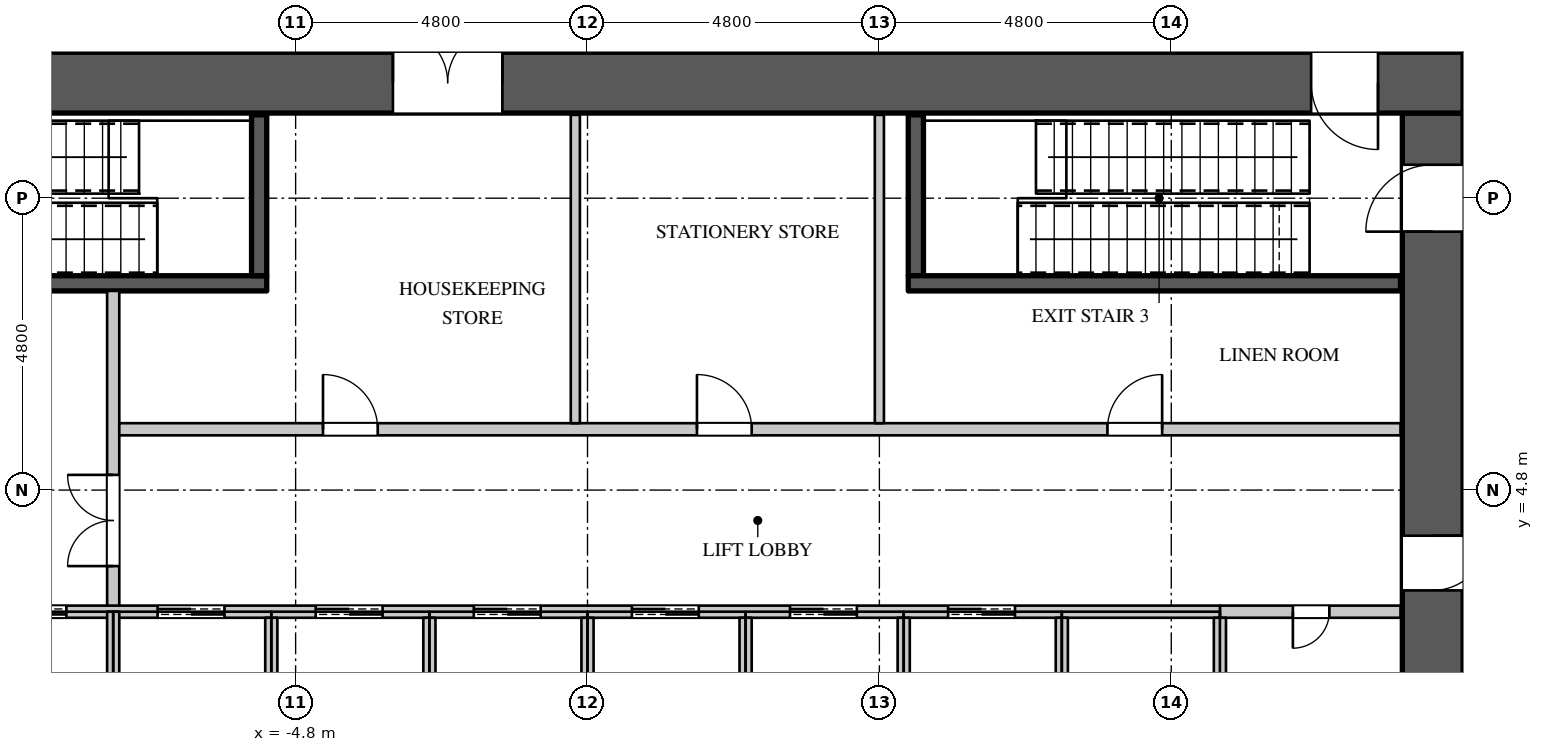
"""IFC4 building model, lengths in metres.
Left out: names, types, materials, properties, quantities, classifications, styles, units other than length and angle.
Written with IfcOpenShell. Run it as: python <this file> out.ifc"""

import sys

from ifc_helpers import new_model, si_unit, direction, frame, frame_2d, origin, place, context, subcontext, project, spatial, rectangle, extrude, element, fill, save


model = new_model("IFC4")
c1 = context("Model", 3, precision=1e-05, world=origin(), true_north=direction((0.0, 1.0)))
c2 = subcontext(c1, "Body", "Model", "MODEL_VIEW")
j1 = project(units=[si_unit("LENGTHUNIT", "METRE"), si_unit("PLANEANGLEUNIT", "RADIAN")], contexts=[c1])
p1 = place(None, origin())
s1 = spatial("IfcSite", under=j1, at=p1, CompositionType="ELEMENT")
p2 = place(p1, origin())
s2 = spatial("IfcBuilding", under=s1, at=p2, CompositionType="ELEMENT")
p3 = place(p2, frame((0.0, 0.0, 101.1)))
s3 = spatial("IfcBuildingStorey", under=s2, at=p3, CompositionType="ELEMENT", Elevation=101.1)
p4 = place(p3, frame((-14.4, 11.5, 0.0), z_axis=(0.0, 0.0, 1.0), x_axis=(1.0, 0.0, 0.0)))
e1 = element("IfcWall", 1, at=p4, inside=s3, PredefinedType="SHEAR", context=c2, shape_type="SweptSolid", body=[
    extrude(rectangle(XDim=28.8, YDim=1.0, at=frame_2d((14.4, 0.0))), origin(), (0.0, 0.0, 1.0), 5.4),
])
p5 = place(p4, frame((1.4, 0.0, 0.0)))
e2 = element("IfcOpeningElement", 2, at=p5, cuts=e1, PredefinedType="OPENING", context=c2, shape_type="SweptSolid", body=[
    extrude(rectangle(XDim=1.1, YDim=2.2, at=frame_2d((0.55, 1.1))), frame((0.0, 0.51, 0.0), z_axis=(0.0, -1.0, 0.0), x_axis=(1.0, 0.0, 0.0)), (0.0, 0.0, 1.0), 1.02),
])
p6 = place(p4, frame((26.3, 0.0, 0.0)))
e3 = element("IfcOpeningElement", 3, at=p6, cuts=e1, PredefinedType="OPENING", context=c2, shape_type="SweptSolid", body=[
    extrude(rectangle(XDim=1.1, YDim=2.2, at=frame_2d((0.55, 1.1))), frame((0.0, 0.51, 0.0), z_axis=(0.0, -1.0, 0.0), x_axis=(1.0, 0.0, 0.0)), (0.0, 0.0, 1.0), 1.02),
])
p7 = place(p4, frame((11.2, 0.0, 0.0)))
e4 = element("IfcOpeningElement", 4, at=p7, cuts=e1, PredefinedType="OPENING", context=c2, shape_type="SweptSolid", body=[
    extrude(rectangle(XDim=1.8, YDim=2.4, at=frame_2d((0.9, 1.2))), frame((0.0, 0.51, 0.0), z_axis=(0.0, -1.0, 0.0), x_axis=(1.0, 0.0, 0.0)), (0.0, 0.0, 1.0), 1.02),
])
p8 = place(p3, frame((13.9, -11.0, 0.0), z_axis=(0.0, 0.0, 1.0), x_axis=(0.0, 1.0, 0.0)))
e5 = element("IfcWall", 5, at=p8, inside=s3, PredefinedType="SHEAR", context=c2, shape_type="SweptSolid", body=[
    extrude(rectangle(XDim=22.0, YDim=1.0, at=frame_2d((11.0, 0.0))), origin(), (0.0, 0.0, 1.0), 5.4),
])
p9 = place(p8, frame((20.05, 0.0, 0.0)))
e6 = element("IfcOpeningElement", 6, at=p9, cuts=e5, PredefinedType="OPENING", context=c2, shape_type="SweptSolid", body=[
    extrude(rectangle(XDim=1.1, YDim=2.2, at=frame_2d((0.55, 1.1))), frame((0.0, 0.51, 0.0), z_axis=(0.0, -1.0, 0.0), x_axis=(1.0, 0.0, 0.0)), (0.0, 0.0, 1.0), 1.02),
])
p10 = place(p8, frame((14.15, 0.0, 0.0)))
e7 = element("IfcOpeningElement", 7, at=p10, cuts=e5, PredefinedType="OPENING", context=c2, shape_type="SweptSolid", body=[
    extrude(rectangle(XDim=0.9, YDim=2.2, at=frame_2d((0.45, 1.1))), frame((0.0, 0.51, 0.0), z_axis=(0.0, -1.0, 0.0), x_axis=(1.0, 0.0, 0.0)), (0.0, 0.0, 1.0), 1.02),
])
p11 = place(p8, frame((0.85, 0.0, 0.0)))
e8 = element("IfcOpeningElement", 8, at=p11, cuts=e5, PredefinedType="OPENING", context=c2, shape_type="SweptSolid", body=[
    extrude(rectangle(XDim=1.1, YDim=2.2, at=frame_2d((0.55, 1.1))), frame((0.0, 0.51, 0.0), z_axis=(0.0, -1.0, 0.0), x_axis=(1.0, 0.0, 0.0)), (0.0, 0.0, 1.0), 1.02),
])
p12 = place(p8, frame((3.5, 0.0, 0.0)))
e9 = element("IfcOpeningElement", 9, at=p12, cuts=e5, PredefinedType="OPENING", context=c2, shape_type="SweptSolid", body=[
    extrude(rectangle(XDim=0.9, YDim=2.2, at=frame_2d((0.45, 1.1))), frame((0.0, 0.51, 0.0), z_axis=(0.0, -1.0, 0.0), x_axis=(1.0, 0.0, 0.0)), (0.0, 0.0, 1.0), 1.02),
])
p13 = place(p3, frame((-7.8, 2.8, 0.0), z_axis=(0.0, 0.0, 1.0), x_axis=(0.0, 1.0, 0.0)))
e10 = element("IfcWall", 10, at=p13, inside=s3, PredefinedType="PARTITIONING", context=c2, shape_type="SweptSolid", body=[
    extrude(rectangle(XDim=5.275, YDim=0.2, at=frame_2d((2.637, 0.0))), origin(), (0.0, 0.0, 1.0), 5.15),
])
p14 = place(p13, frame((0.75, 0.0, 0.0)))
e11 = element("IfcOpeningElement", 11, at=p14, cuts=e10, PredefinedType="OPENING", context=c2, shape_type="SweptSolid", body=[
    extrude(rectangle(XDim=1.5, YDim=2.4, at=frame_2d((0.75, 1.2))), frame((0.0, 0.11, 0.0), z_axis=(0.0, -1.0, 0.0), x_axis=(1.0, 0.0, 0.0)), (0.0, 0.0, 1.0), 0.22),
])
p15 = place(p3, frame((-7.7, 5.8, 0.0), z_axis=(0.0, 0.0, 1.0), x_axis=(1.0, 0.0, 0.0)))
e12 = element("IfcWall", 12, at=p15, inside=s3, PredefinedType="PARTITIONING", context=c2, shape_type="SweptSolid", body=[
    extrude(rectangle(XDim=21.07, YDim=0.2, at=frame_2d((10.535, 0.0))), origin(), (0.0, 0.0, 1.0), 5.15),
])
p16 = place(p15, frame((3.35, 0.0, 0.0)))
e13 = element("IfcOpeningElement", 13, at=p16, cuts=e12, PredefinedType="OPENING", context=c2, shape_type="SweptSolid", body=[
    extrude(rectangle(XDim=0.9, YDim=2.2, at=frame_2d((0.45, 1.1))), frame((0.0, 0.11, 0.0), z_axis=(0.0, -1.0, 0.0), x_axis=(1.0, 0.0, 0.0)), (0.0, 0.0, 1.0), 0.22),
])
p17 = place(p15, frame((9.5, 0.0, 0.0)))
e14 = element("IfcOpeningElement", 14, at=p17, cuts=e12, PredefinedType="OPENING", context=c2, shape_type="SweptSolid", body=[
    extrude(rectangle(XDim=0.9, YDim=2.2, at=frame_2d((0.45, 1.1))), frame((0.0, 0.11, 0.0), z_axis=(0.0, -1.0, 0.0), x_axis=(1.0, 0.0, 0.0)), (0.0, 0.0, 1.0), 0.22),
])
p18 = place(p15, frame((16.25, 0.0, 0.0)))
e15 = element("IfcOpeningElement", 15, at=p18, cuts=e12, PredefinedType="OPENING", context=c2, shape_type="SweptSolid", body=[
    extrude(rectangle(XDim=0.9, YDim=2.2, at=frame_2d((0.45, 1.1))), frame((0.0, 0.11, 0.0), z_axis=(0.0, -1.0, 0.0), x_axis=(1.0, 0.0, 0.0)), (0.0, 0.0, 1.0), 0.22),
])
for number, where, z_axis, x_axis in (
    (16, (-0.2, 5.9, 0.0), (0.0, 0.0, 1.0), (0.0, 1.0, 0.0)),
    (17, (4.8, 5.9, 0.0), (0.0, 0.0, 1.0), (0.0, 1.0, 0.0)),
):
    element("IfcWall", number, at=place(p3, frame(where, z_axis=z_axis, x_axis=x_axis)), inside=s3, PredefinedType="PARTITIONING", context=c2, shape_type="SweptSolid", body=[
        extrude(rectangle(XDim=5.07, YDim=0.15, at=frame_2d((2.535, 0.0))), origin(), (0.0, 0.0, 1.0), 5.15),
    ])
p19 = place(p3, frame((10.4, 2.8, 0.0), z_axis=(0.0, 0.0, 1.0), x_axis=(1.0, 0.0, 0.0)))
e18 = element("IfcWall", 18, at=p19, inside=s3, PredefinedType="PARTITIONING", context=c2, shape_type="SweptSolid", body=[
    extrude(rectangle(XDim=2.97, YDim=0.2, at=frame_2d((1.485, 0.0))), origin(), (0.0, 0.0, 1.0), 5.15),
])
p20 = place(p19, frame((1.2, 0.0, 0.0)))
e19 = element("IfcOpeningElement", 19, at=p20, cuts=e18, PredefinedType="OPENING", context=c2, shape_type="SweptSolid", body=[
    extrude(rectangle(XDim=0.6, YDim=2.0, at=frame_2d((0.3, 1.0))), frame((0.0, 0.11, 0.0), z_axis=(0.0, -1.0, 0.0), x_axis=(1.0, 0.0, 0.0)), (0.0, 0.0, 1.0), 0.22),
])
p21 = place(p3, frame((-13.37, 2.8, 0.0), z_axis=(0.0, 0.0, 1.0), x_axis=(1.0, 0.0, 0.0)))
e20 = element("IfcWall", 20, at=p21, inside=s3, PredefinedType="PARTITIONING", context=c2, shape_type="SweptSolid", body=[
    extrude(rectangle(XDim=23.77, YDim=0.2, at=frame_2d((11.885, 0.0))), origin(), (0.0, 0.0, 1.0), 5.15),
])
p22 = place(p21, frame((0.9, 0.0, 0.0)))
e21 = element("IfcOpeningElement", 21, at=p22, cuts=e20, PredefinedType="OPENING", context=c2, shape_type="SweptSolid", body=[
    extrude(rectangle(XDim=1.1, YDim=2.2, at=frame_2d((0.55, 1.1))), frame((0.0, 0.11, 0.0), z_axis=(0.0, -1.0, 0.0), x_axis=(1.0, 0.0, 0.0)), (0.0, 0.0, 1.0), 0.22),
])
p23 = place(p21, frame((3.7, 0.0, 0.0)))
e22 = element("IfcOpeningElement", 22, at=p23, cuts=e20, PredefinedType="OPENING", context=c2, shape_type="SweptSolid", body=[
    extrude(rectangle(XDim=1.1, YDim=2.2, at=frame_2d((0.55, 1.1))), frame((0.0, 0.11, 0.0), z_axis=(0.0, -1.0, 0.0), x_axis=(1.0, 0.0, 0.0)), (0.0, 0.0, 1.0), 0.22),
])
p24 = place(p21, frame((6.3, 0.0, 0.0)))
e23 = element("IfcOpeningElement", 23, at=p24, cuts=e20, PredefinedType="OPENING", context=c2, shape_type="SweptSolid", body=[
    extrude(rectangle(XDim=1.1, YDim=2.2, at=frame_2d((0.55, 1.1))), frame((0.0, 0.11, 0.0), z_axis=(0.0, -1.0, 0.0), x_axis=(1.0, 0.0, 0.0)), (0.0, 0.0, 1.0), 0.22),
])
p25 = place(p21, frame((8.9, 0.0, 0.0)))
e24 = element("IfcOpeningElement", 24, at=p25, cuts=e20, PredefinedType="OPENING", context=c2, shape_type="SweptSolid", body=[
    extrude(rectangle(XDim=1.1, YDim=2.2, at=frame_2d((0.55, 1.1))), frame((0.0, 0.11, 0.0), z_axis=(0.0, -1.0, 0.0), x_axis=(1.0, 0.0, 0.0)), (0.0, 0.0, 1.0), 0.22),
])
p26 = place(p21, frame((11.5, 0.0, 0.0)))
e25 = element("IfcOpeningElement", 25, at=p26, cuts=e20, PredefinedType="OPENING", context=c2, shape_type="SweptSolid", body=[
    extrude(rectangle(XDim=1.1, YDim=2.2, at=frame_2d((0.55, 1.1))), frame((0.0, 0.11, 0.0), z_axis=(0.0, -1.0, 0.0), x_axis=(1.0, 0.0, 0.0)), (0.0, 0.0, 1.0), 0.22),
])
p27 = place(p21, frame((14.1, 0.0, 0.0)))
e26 = element("IfcOpeningElement", 26, at=p27, cuts=e20, PredefinedType="OPENING", context=c2, shape_type="SweptSolid", body=[
    extrude(rectangle(XDim=1.1, YDim=2.2, at=frame_2d((0.55, 1.1))), frame((0.0, 0.11, 0.0), z_axis=(0.0, -1.0, 0.0), x_axis=(1.0, 0.0, 0.0)), (0.0, 0.0, 1.0), 0.22),
])
p28 = place(p21, frame((16.7, 0.0, 0.0)))
e27 = element("IfcOpeningElement", 27, at=p28, cuts=e20, PredefinedType="OPENING", context=c2, shape_type="SweptSolid", body=[
    extrude(rectangle(XDim=1.1, YDim=2.2, at=frame_2d((0.55, 1.1))), frame((0.0, 0.11, 0.0), z_axis=(0.0, -1.0, 0.0), x_axis=(1.0, 0.0, 0.0)), (0.0, 0.0, 1.0), 0.22),
])
p29 = place(p21, frame((19.3, 0.0, 0.0)))
e28 = element("IfcOpeningElement", 28, at=p29, cuts=e20, PredefinedType="OPENING", context=c2, shape_type="SweptSolid", body=[
    extrude(rectangle(XDim=1.1, YDim=2.2, at=frame_2d((0.55, 1.1))), frame((0.0, 0.11, 0.0), z_axis=(0.0, -1.0, 0.0), x_axis=(1.0, 0.0, 0.0)), (0.0, 0.0, 1.0), 0.22),
])
p30 = place(p3, frame((-7.8, 0.0, 0.0), z_axis=(0.0, 0.0, 1.0), x_axis=(0.0, 1.0, 0.0)))
e29 = element("IfcWall", 29, at=p30, inside=s3, PredefinedType="PARTITIONING", context=c2, shape_type="SweptSolid", body=[
    extrude(rectangle(XDim=2.8, YDim=0.2, at=frame_2d((1.4, 0.0))), origin(), (0.0, 0.0, 1.0), 5.15),
])
for number, where, z_axis, x_axis in (
    (30, (-5.2, 0.1, 0.0), (0.0, 0.0, 1.0), (0.0, 1.0, 0.0)),
    (31, (-2.6, 0.1, 0.0), (0.0, 0.0, 1.0), (0.0, 1.0, 0.0)),
    (32, (0.0, 0.1, 0.0), (0.0, 0.0, 1.0), (0.0, 1.0, 0.0)),
    (33, (2.6, 0.1, 0.0), (0.0, 0.0, 1.0), (0.0, 1.0, 0.0)),
    (34, (5.2, 0.1, 0.0), (0.0, 0.0, 1.0), (0.0, 1.0, 0.0)),
):
    element("IfcWall", number, at=place(p3, frame(where, z_axis=z_axis, x_axis=x_axis)), inside=s3, PredefinedType="PARTITIONING", context=c2, shape_type="SweptSolid", body=[
        extrude(rectangle(XDim=2.6, YDim=0.2, at=frame_2d((1.3, 0.0))), origin(), (0.0, 0.0, 1.0), 5.15),
    ])
p31 = place(p3, frame((7.8, 0.0, 0.0), z_axis=(0.0, 0.0, 1.0), x_axis=(0.0, 1.0, 0.0)))
e35 = element("IfcWall", 35, at=p31, inside=s3, PredefinedType="PARTITIONING", context=c2, shape_type="SweptSolid", body=[
    extrude(rectangle(XDim=2.7, YDim=0.2, at=frame_2d((1.35, 0.0))), origin(), (0.0, 0.0, 1.0), 5.15),
])
p32 = place(p3, frame((10.4, -2.7, 0.0), z_axis=(0.0, 0.0, 1.0), x_axis=(0.0, 1.0, 0.0)))
e36 = element("IfcWall", 36, at=p32, inside=s3, PredefinedType="PARTITIONING", context=c2, shape_type="SweptSolid", body=[
    extrude(rectangle(XDim=5.4, YDim=0.2, at=frame_2d((2.7, 0.0))), origin(), (0.0, 0.0, 1.0), 5.15),
])
p33 = place(p3, frame((-13.37, 8.2, 0.0), z_axis=(0.0, 0.0, 1.0), x_axis=(1.0, 0.0, 0.0)))
e37 = element("IfcWall", 37, at=p33, inside=s3, PredefinedType="SHEAR", context=c2, shape_type="SweptSolid", body=[
    extrude(rectangle(XDim=8.095, YDim=0.25, at=frame_2d((4.048, 0.0))), origin(), (0.0, 0.0, 1.0), 5.15),
])
p34 = place(p33, frame((0.15, 0.0, 0.0)))
e38 = element("IfcOpeningElement", 38, at=p34, cuts=e37, PredefinedType="OPENING", context=c2, shape_type="SweptSolid", body=[
    extrude(rectangle(XDim=1.1, YDim=2.2, at=frame_2d((0.55, 1.1))), frame((0.0, 0.135, 0.0), z_axis=(0.0, -1.0, 0.0), x_axis=(1.0, 0.0, 0.0)), (0.0, 0.0, 1.0), 0.27),
])
for number, where, z_axis, x_axis in (
    (39, (-5.4, 8.325, 0.0), (0.0, 0.0, 1.0), (0.0, 1.0, 0.0)),
    (40, (5.4, 8.325, 0.0), (0.0, 0.0, 1.0), (0.0, 1.0, 0.0)),
):
    element("IfcWall", number, at=place(p3, frame(where, z_axis=z_axis, x_axis=x_axis)), inside=s3, PredefinedType="SHEAR", context=c2, shape_type="SweptSolid", body=[
        extrude(rectangle(XDim=2.645, YDim=0.25, at=frame_2d((1.323, 0.0))), origin(), (0.0, 0.0, 1.0), 5.15),
    ])
p35 = place(p3, frame((5.275, 8.2, 0.0), z_axis=(0.0, 0.0, 1.0), x_axis=(1.0, 0.0, 0.0)))
e41 = element("IfcWall", 41, at=p35, inside=s3, PredefinedType="SHEAR", context=c2, shape_type="SweptSolid", body=[
    extrude(rectangle(XDim=8.095, YDim=0.25, at=frame_2d((4.048, 0.0))), origin(), (0.0, 0.0, 1.0), 5.15),
])
p36 = place(p20, origin())
e42 = element("IfcDoor", 42, at=p36, inside=s3, OperationType="SINGLE_SWING_RIGHT", PredefinedType="DOOR", context=c2, shape_type="SweptSolid", body=[
    extrude(rectangle(XDim=0.6, YDim=2.0, at=frame_2d((0.3, 1.0))), frame((0.0, 0.025, 0.0), z_axis=(0.0, -1.0, 0.0), x_axis=(1.0, 0.0, 0.0)), (0.0, 0.0, 1.0), 0.05),
])
fill(e19, e42)
p37 = place(p16, origin())
e43 = element("IfcDoor", 43, at=p37, inside=s3, OperationType="SINGLE_SWING_LEFT", PredefinedType="DOOR", context=c2, shape_type="SweptSolid", body=[
    extrude(rectangle(XDim=0.9, YDim=2.2, at=frame_2d((0.45, 1.1))), frame((0.0, 0.025, 0.0), z_axis=(0.0, -1.0, 0.0), x_axis=(1.0, 0.0, 0.0)), (0.0, 0.0, 1.0), 0.05),
])
fill(e13, e43)
p38 = place(p17, origin())
e44 = element("IfcDoor", 44, at=p38, inside=s3, OperationType="SINGLE_SWING_LEFT", PredefinedType="DOOR", context=c2, shape_type="SweptSolid", body=[
    extrude(rectangle(XDim=0.9, YDim=2.2, at=frame_2d((0.45, 1.1))), frame((0.0, 0.025, 0.0), z_axis=(0.0, -1.0, 0.0), x_axis=(1.0, 0.0, 0.0)), (0.0, 0.0, 1.0), 0.05),
])
fill(e14, e44)
p39 = place(p18, origin())
e45 = element("IfcDoor", 45, at=p39, inside=s3, OperationType="SINGLE_SWING_RIGHT", PredefinedType="DOOR", context=c2, shape_type="SweptSolid", body=[
    extrude(rectangle(XDim=0.9, YDim=2.2, at=frame_2d((0.45, 1.1))), frame((0.0, 0.025, 0.0), z_axis=(0.0, -1.0, 0.0), x_axis=(1.0, 0.0, 0.0)), (0.0, 0.0, 1.0), 0.05),
])
fill(e15, e45)
p40 = place(p23, origin())
e46 = element("IfcDoor", 46, at=p40, inside=s3, OperationType="DOUBLE_DOOR_SLIDING", PredefinedType="DOOR", context=c2, shape_type="SweptSolid", body=[
    extrude(rectangle(XDim=1.1, YDim=2.2, at=frame_2d((0.55, 1.1))), frame((0.0, 0.025, 0.0), z_axis=(0.0, -1.0, 0.0), x_axis=(1.0, 0.0, 0.0)), (0.0, 0.0, 1.0), 0.05),
])
fill(e22, e46)
p41 = place(p24, origin())
e47 = element("IfcDoor", 47, at=p41, inside=s3, OperationType="DOUBLE_DOOR_SLIDING", PredefinedType="DOOR", context=c2, shape_type="SweptSolid", body=[
    extrude(rectangle(XDim=1.1, YDim=2.2, at=frame_2d((0.55, 1.1))), frame((0.0, 0.025, 0.0), z_axis=(0.0, -1.0, 0.0), x_axis=(1.0, 0.0, 0.0)), (0.0, 0.0, 1.0), 0.05),
])
fill(e23, e47)
p42 = place(p25, origin())
e48 = element("IfcDoor", 48, at=p42, inside=s3, OperationType="DOUBLE_DOOR_SLIDING", PredefinedType="DOOR", context=c2, shape_type="SweptSolid", body=[
    extrude(rectangle(XDim=1.1, YDim=2.2, at=frame_2d((0.55, 1.1))), frame((0.0, 0.025, 0.0), z_axis=(0.0, -1.0, 0.0), x_axis=(1.0, 0.0, 0.0)), (0.0, 0.0, 1.0), 0.05),
])
fill(e24, e48)
p43 = place(p26, origin())
e49 = element("IfcDoor", 49, at=p43, inside=s3, OperationType="DOUBLE_DOOR_SLIDING", PredefinedType="DOOR", context=c2, shape_type="SweptSolid", body=[
    extrude(rectangle(XDim=1.1, YDim=2.2, at=frame_2d((0.55, 1.1))), frame((0.0, 0.025, 0.0), z_axis=(0.0, -1.0, 0.0), x_axis=(1.0, 0.0, 0.0)), (0.0, 0.0, 1.0), 0.05),
])
fill(e25, e49)
p44 = place(p27, origin())
e50 = element("IfcDoor", 50, at=p44, inside=s3, OperationType="DOUBLE_DOOR_SLIDING", PredefinedType="DOOR", context=c2, shape_type="SweptSolid", body=[
    extrude(rectangle(XDim=1.1, YDim=2.2, at=frame_2d((0.55, 1.1))), frame((0.0, 0.025, 0.0), z_axis=(0.0, -1.0, 0.0), x_axis=(1.0, 0.0, 0.0)), (0.0, 0.0, 1.0), 0.05),
])
fill(e26, e50)
p45 = place(p28, origin())
e51 = element("IfcDoor", 51, at=p45, inside=s3, OperationType="DOUBLE_DOOR_SLIDING", PredefinedType="DOOR", context=c2, shape_type="SweptSolid", body=[
    extrude(rectangle(XDim=1.1, YDim=2.2, at=frame_2d((0.55, 1.1))), frame((0.0, 0.025, 0.0), z_axis=(0.0, -1.0, 0.0), x_axis=(1.0, 0.0, 0.0)), (0.0, 0.0, 1.0), 0.05),
])
fill(e27, e51)
p46 = place(p29, origin())
e52 = element("IfcDoor", 52, at=p46, inside=s3, OperationType="DOUBLE_DOOR_SLIDING", PredefinedType="DOOR", context=c2, shape_type="SweptSolid", body=[
    extrude(rectangle(XDim=1.1, YDim=2.2, at=frame_2d((0.55, 1.1))), frame((0.0, 0.025, 0.0), z_axis=(0.0, -1.0, 0.0), x_axis=(1.0, 0.0, 0.0)), (0.0, 0.0, 1.0), 0.05),
])
fill(e28, e52)
p47 = place(p14, origin())
e53 = element("IfcDoor", 53, at=p47, inside=s3, OperationType="DOUBLE_DOOR_SINGLE_SWING", PredefinedType="DOOR", context=c2, shape_type="SweptSolid", body=[
    extrude(rectangle(XDim=1.5, YDim=2.4, at=frame_2d((0.75, 1.2))), frame((0.0, 0.025, 0.0), z_axis=(0.0, -1.0, 0.0), x_axis=(1.0, 0.0, 0.0)), (0.0, 0.0, 1.0), 0.05),
])
fill(e11, e53)
p48 = place(p6, origin())
e54 = element("IfcDoor", 54, at=p48, inside=s3, OperationType="SINGLE_SWING_LEFT", PredefinedType="DOOR", context=c2, shape_type="SweptSolid", body=[
    extrude(rectangle(XDim=1.1, YDim=2.2, at=frame_2d((0.55, 1.1))), frame((0.0, -0.445, 0.0), z_axis=(0.0, -1.0, 0.0), x_axis=(1.0, 0.0, 0.0)), (0.0, 0.0, 1.0), 0.05),
])
fill(e3, e54)
p49 = place(p7, origin())
e55 = element("IfcDoor", 55, at=p49, inside=s3, OperationType="DOUBLE_DOOR_SINGLE_SWING", PredefinedType="DOOR", context=c2, shape_type="SweptSolid", body=[
    extrude(rectangle(XDim=1.8, YDim=2.4, at=frame_2d((0.9, 1.2))), frame((0.0, 0.495, 0.0), z_axis=(0.0, -1.0, 0.0), x_axis=(1.0, 0.0, 0.0)), (0.0, 0.0, 1.0), 0.05),
])
fill(e4, e55)
p50 = place(p9, origin())
e56 = element("IfcDoor", 56, at=p50, inside=s3, OperationType="SINGLE_SWING_LEFT", PredefinedType="DOOR", context=c2, shape_type="SweptSolid", body=[
    extrude(rectangle(XDim=1.1, YDim=2.2, at=frame_2d((0.55, 1.1))), frame((0.0, 0.495, 0.0), z_axis=(0.0, -1.0, 0.0), x_axis=(1.0, 0.0, 0.0)), (0.0, 0.0, 1.0), 0.05),
])
fill(e6, e56)
p51 = place(p10, origin())
e57 = element("IfcDoor", 57, at=p51, inside=s3, OperationType="SINGLE_SWING_LEFT", PredefinedType="DOOR", context=c2, shape_type="SweptSolid", body=[
    extrude(rectangle(XDim=0.9, YDim=2.2, at=frame_2d((0.45, 1.1))), frame((0.0, -0.445, 0.0), z_axis=(0.0, -1.0, 0.0), x_axis=(1.0, 0.0, 0.0)), (0.0, 0.0, 1.0), 0.05),
])
fill(e7, e57)
save(model, sys.argv[1])
